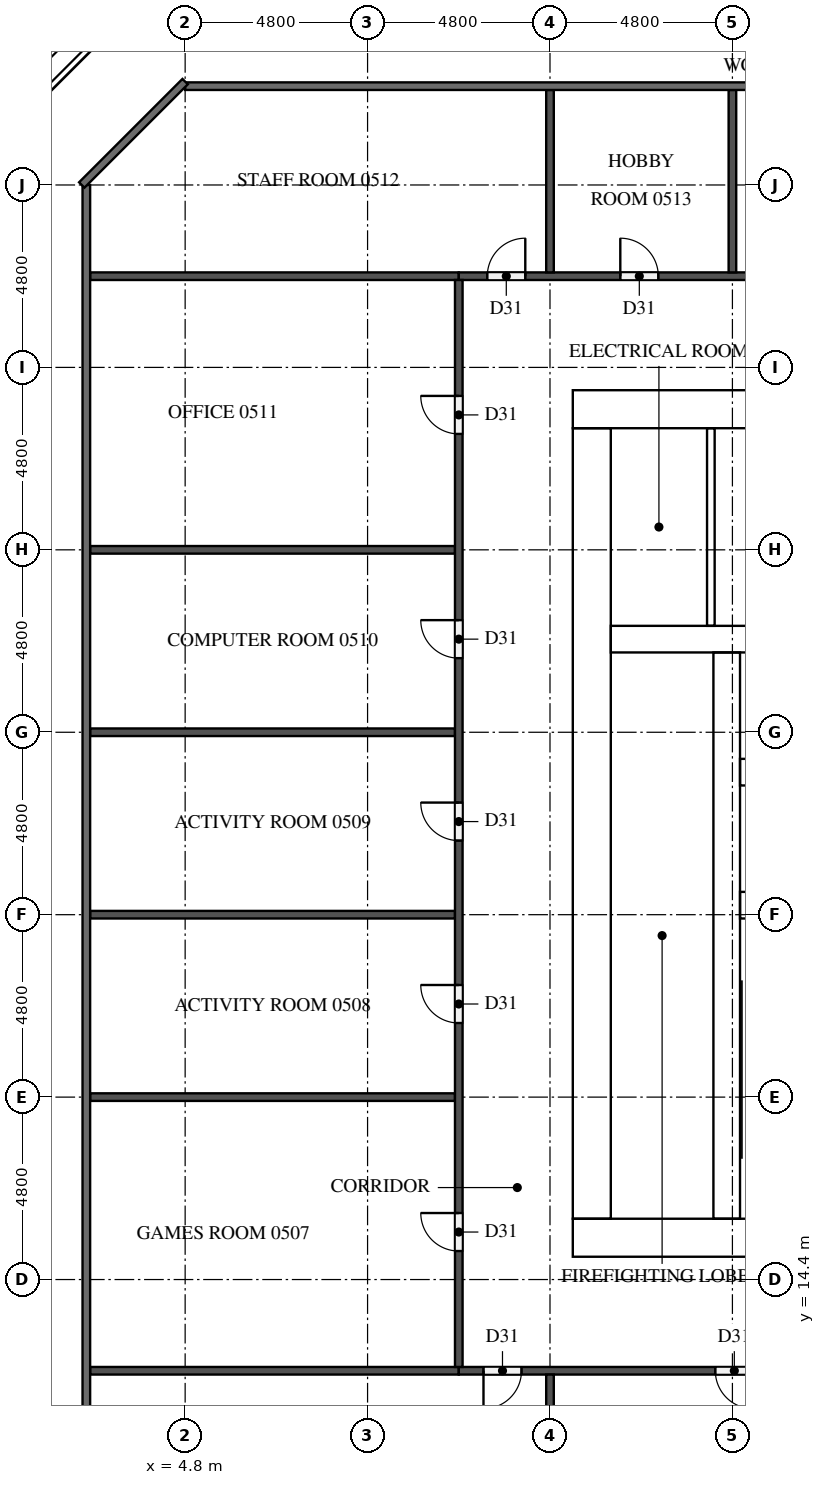
"""IFC4 building model, lengths in metres.
Left out: names, types, materials, properties, quantities, classifications, styles, units other than length and angle.
Written with IfcOpenShell. Run it as: python <this file> out.ifc"""

import sys

from ifc_helpers import new_model, si_unit, direction, frame, frame_2d, origin, place, context, subcontext, project, spatial, rectangle, extrude, element, fill, save


model = new_model("IFC4")
c1 = context("Model", 3, precision=1e-05, world=origin(), true_north=direction((0.0, 1.0)))
c2 = subcontext(c1, "Body", "Model", "MODEL_VIEW")
j1 = project(units=[si_unit("LENGTHUNIT", "METRE"), si_unit("PLANEANGLEUNIT", "RADIAN")], contexts=[c1])
p1 = place(None, origin())
s1 = spatial("IfcSite", under=j1, at=p1, CompositionType="ELEMENT")
p2 = place(p1, origin())
s2 = spatial("IfcBuilding", under=s1, at=p2, CompositionType="ELEMENT")
p3 = place(p2, frame((0.0, 0.0, 24.0)))
s3 = spatial("IfcBuildingStorey", under=s2, at=p3, CompositionType="ELEMENT", Elevation=24.0)
p4 = place(p3, frame((15.0, 15.5, 0.0), z_axis=(0.0, 0.0, 1.0), x_axis=(1.0, 0.0, 0.0)))
e1 = element("IfcWall", 1, at=p4, inside=s3, PredefinedType="SHEAR", context=c2, shape_type="SweptSolid", body=[
    extrude(rectangle(XDim=32.4, YDim=1.0, at=frame_2d((16.2, 0.0))), origin(), (0.0, 0.0, 1.0), 5.1),
])
p5 = place(p4, frame((15.3, 0.0, 0.0)))
e2 = element("IfcOpeningElement", 2, at=p5, cuts=e1, PredefinedType="OPENING", context=c2, shape_type="SweptSolid", body=[
    extrude(rectangle(XDim=1.8, YDim=2.1, at=frame_2d((0.9, 1.05))), frame((0.0, 0.51, 0.0), z_axis=(0.0, -1.0, 0.0), x_axis=(1.0, 0.0, 0.0)), (0.0, 0.0, 1.0), 1.02),
])
p6 = place(p3, frame((15.0, 37.3, 0.0), z_axis=(0.0, 0.0, 1.0), x_axis=(1.0, 0.0, 0.0)))
e3 = element("IfcWall", 3, at=p6, inside=s3, PredefinedType="SHEAR", context=c2, shape_type="SweptSolid", body=[
    extrude(rectangle(XDim=32.4, YDim=1.0, at=frame_2d((16.2, 0.0))), origin(), (0.0, 0.0, 1.0), 5.1),
])
p7 = place(p6, frame((15.3, 0.0, 0.0)))
e4 = element("IfcOpeningElement", 4, at=p7, cuts=e3, PredefinedType="OPENING", context=c2, shape_type="SweptSolid", body=[
    extrude(rectangle(XDim=1.8, YDim=2.1, at=frame_2d((0.9, 1.05))), frame((0.0, 0.51, 0.0), z_axis=(0.0, -1.0, 0.0), x_axis=(1.0, 0.0, 0.0)), (0.0, 0.0, 1.0), 1.02),
])
p8 = place(p6, frame((1.766, 0.0, 0.0)))
e5 = element("IfcOpeningElement", 5, at=p8, cuts=e3, PredefinedType="OPENING", context=c2, shape_type="SweptSolid", body=[
    extrude(rectangle(XDim=1.0, YDim=2.1, at=frame_2d((0.5, 1.05))), frame((0.0, 0.51, 0.0), z_axis=(0.0, -1.0, 0.0), x_axis=(1.0, 0.0, 0.0)), (0.0, 0.0, 1.0), 1.02),
])
p9 = place(p6, frame((5.241, 0.0, 0.0)))
e6 = element("IfcOpeningElement", 6, at=p9, cuts=e3, PredefinedType="OPENING", context=c2, shape_type="SweptSolid", body=[
    extrude(rectangle(XDim=1.0, YDim=2.1, at=frame_2d((0.5, 1.05))), frame((0.0, 0.51, 0.0), z_axis=(0.0, -1.0, 0.0), x_axis=(1.0, 0.0, 0.0)), (0.0, 0.0, 1.0), 1.02),
])
p10 = place(p3, frame((15.5, 16.0, 0.0), z_axis=(0.0, 0.0, 1.0), x_axis=(0.0, 1.0, 0.0)))
e7 = element("IfcWall", 7, at=p10, inside=s3, PredefinedType="SHEAR", context=c2, shape_type="SweptSolid", body=[
    extrude(rectangle(XDim=20.8, YDim=1.0, at=frame_2d((10.4, 0.0))), origin(), (0.0, 0.0, 1.0), 5.1),
])
p11 = place(p10, frame((4.76, 0.0, 0.0)))
e8 = element("IfcOpeningElement", 8, at=p11, cuts=e7, PredefinedType="OPENING", context=c2, shape_type="SweptSolid", body=[
    extrude(rectangle(XDim=1.2, YDim=2.1, at=frame_2d((0.6, 1.05))), frame((0.0, 0.51, 0.0), z_axis=(0.0, -1.0, 0.0), x_axis=(1.0, 0.0, 0.0)), (0.0, 0.0, 1.0), 1.02),
])
p12 = place(p3, frame((19.05, 16.0, 0.0), z_axis=(0.0, 0.0, 1.0), x_axis=(0.0, 1.0, 0.0)))
e9 = element("IfcWall", 9, at=p12, inside=s3, PredefinedType="SHEAR", context=c2, shape_type="SweptSolid", body=[
    extrude(rectangle(XDim=14.9, YDim=0.7, at=frame_2d((7.45, 0.0))), origin(), (0.0, 0.0, 1.0), 5.1),
])
p13 = place(p12, frame((9.45, 0.0, 0.0)))
e10 = element("IfcOpeningElement", 10, at=p13, cuts=e9, PredefinedType="OPENING", context=c2, shape_type="SweptSolid", body=[
    extrude(rectangle(XDim=1.1, YDim=2.1, at=frame_2d((0.55, 1.05))), frame((0.0, 0.36, 0.0), z_axis=(0.0, -1.0, 0.0), x_axis=(1.0, 0.0, 0.0)), (0.0, 0.0, 1.0), 0.72),
])
p14 = place(p12, frame((12.95, 0.0, 0.0)))
e11 = element("IfcOpeningElement", 11, at=p14, cuts=e9, PredefinedType="OPENING", context=c2, shape_type="SweptSolid", body=[
    extrude(rectangle(XDim=1.1, YDim=2.1, at=frame_2d((0.55, 1.05))), frame((0.0, 0.36, 0.0), z_axis=(0.0, -1.0, 0.0), x_axis=(1.0, 0.0, 0.0)), (0.0, 0.0, 1.0), 0.72),
])
p15 = place(p12, frame((0.2, 0.0, 0.0)))
e12 = element("IfcOpeningElement", 12, at=p15, cuts=e9, PredefinedType="OPENING", context=c2, shape_type="SweptSolid", body=[
    extrude(rectangle(XDim=1.2, YDim=2.1, at=frame_2d((0.6, 1.05))), frame((0.0, 0.36, 0.0), z_axis=(0.0, -1.0, 0.0), x_axis=(1.0, 0.0, 0.0)), (0.0, 0.0, 1.0), 0.72),
])
for number, where, z_axis, x_axis in (
    (13, (19.4, 24.25, 0.0), (0.0, 0.0, 1.0), (1.0, 0.0, 0.0)),
    (14, (19.4, 27.75, 0.0), (0.0, 0.0, 1.0), (1.0, 0.0, 0.0)),
):
    element("IfcWall", number, at=place(p3, frame(where, z_axis=z_axis, x_axis=x_axis)), inside=s3, PredefinedType="SHEAR", context=c2, shape_type="SweptSolid", body=[
        extrude(rectangle(XDim=3.35, YDim=0.7, at=frame_2d((1.675, 0.0))), origin(), (0.0, 0.0, 1.0), 5.1),
    ])
p16 = place(p3, frame((16.0, 31.25, 0.0), z_axis=(0.0, 0.0, 1.0), x_axis=(1.0, 0.0, 0.0)))
e15 = element("IfcWall", 15, at=p16, inside=s3, PredefinedType="SHEAR", context=c2, shape_type="SweptSolid", body=[
    extrude(rectangle(XDim=6.75, YDim=0.7, at=frame_2d((3.375, 0.0))), origin(), (0.0, 0.0, 1.0), 5.1),
])
p17 = place(p3, frame((18.633, 31.6, 0.0), z_axis=(0.0, 0.0, 1.0), x_axis=(0.0, 1.0, 0.0)))
e16 = element("IfcWall", 16, at=p17, inside=s3, PredefinedType="PARTITIONING", context=c2, shape_type="SweptSolid", body=[
    extrude(rectangle(XDim=5.2, YDim=0.2, at=frame_2d((2.6, 0.0))), origin(), (0.0, 0.0, 1.0), 5.1),
])
p18 = place(p3, frame((2.3, 12.0, 0.0), z_axis=(0.0, 0.0, 1.0), x_axis=(1.0, 0.0, 0.0)))
e17 = element("IfcWall", 17, at=p18, inside=s3, PredefinedType="PARTITIONING", context=c2, shape_type="SweptSolid", body=[
    extrude(rectangle(XDim=9.7, YDim=0.2, at=frame_2d((4.85, 0.0))), origin(), (0.0, 0.0, 1.0), 5.1),
])
p19 = place(p3, frame((33.6, 12.0, 0.0), z_axis=(0.0, 0.0, 1.0), x_axis=(-1.0, 0.0, 0.0)))
e18 = element("IfcWall", 18, at=p19, inside=s3, PredefinedType="PARTITIONING", context=c2, shape_type="SweptSolid", body=[
    extrude(rectangle(XDim=21.6, YDim=0.2, at=frame_2d((10.8, 0.0))), origin(), (0.0, 0.0, 1.0), 5.1),
])
p20 = place(p19, frame((19.95, 0.0, 0.0)))
e19 = element("IfcOpeningElement", 19, at=p20, cuts=e18, PredefinedType="OPENING", context=c2, shape_type="SweptSolid", body=[
    extrude(rectangle(XDim=1.0, YDim=2.1, at=frame_2d((0.5, 1.05))), frame((0.0, 0.11, 0.0), z_axis=(0.0, -1.0, 0.0), x_axis=(1.0, 0.0, 0.0)), (0.0, 0.0, 1.0), 0.22),
])
p21 = place(p19, frame((13.85, 0.0, 0.0)))
e20 = element("IfcOpeningElement", 20, at=p21, cuts=e18, PredefinedType="OPENING", context=c2, shape_type="SweptSolid", body=[
    extrude(rectangle(XDim=1.0, YDim=2.1, at=frame_2d((0.5, 1.05))), frame((0.0, 0.11, 0.0), z_axis=(0.0, -1.0, 0.0), x_axis=(1.0, 0.0, 0.0)), (0.0, 0.0, 1.0), 0.22),
])
p22 = place(p19, frame((4.35, 0.0, 0.0)))
e21 = element("IfcOpeningElement", 21, at=p22, cuts=e18, PredefinedType="OPENING", context=c2, shape_type="SweptSolid", body=[
    extrude(rectangle(XDim=1.0, YDim=2.1, at=frame_2d((0.5, 1.05))), frame((0.0, 0.11, 0.0), z_axis=(0.0, -1.0, 0.0), x_axis=(1.0, 0.0, 0.0)), (0.0, 0.0, 1.0), 0.22),
])
for number, where, z_axis, x_axis in (
    (22, (2.3, 19.2, 0.0), (0.0, 0.0, 1.0), (1.0, 0.0, 0.0)),
    (23, (2.3, 24.0, 0.0), (0.0, 0.0, 1.0), (1.0, 0.0, 0.0)),
    (24, (2.3, 28.8, 0.0), (0.0, 0.0, 1.0), (1.0, 0.0, 0.0)),
    (25, (2.3, 33.6, 0.0), (0.0, 0.0, 1.0), (1.0, 0.0, 0.0)),
):
    element("IfcWall", number, at=place(p3, frame(where, z_axis=z_axis, x_axis=x_axis)), inside=s3, PredefinedType="PARTITIONING", context=c2, shape_type="SweptSolid", body=[
        extrude(rectangle(XDim=9.6, YDim=0.2, at=frame_2d((4.8, 0.0))), origin(), (0.0, 0.0, 1.0), 5.1),
    ])
p23 = place(p3, frame((2.3, 40.8, 0.0), z_axis=(0.0, 0.0, 1.0), x_axis=(1.0, 0.0, 0.0)))
e26 = element("IfcWall", 26, at=p23, inside=s3, PredefinedType="PARTITIONING", context=c2, shape_type="SweptSolid", body=[
    extrude(rectangle(XDim=9.7, YDim=0.2, at=frame_2d((4.85, 0.0))), origin(), (0.0, 0.0, 1.0), 5.1),
])
p24 = place(p3, frame((12.0, 40.8, 0.0), z_axis=(0.0, 0.0, 1.0), x_axis=(1.0, 0.0, 0.0)))
e27 = element("IfcWall", 27, at=p24, inside=s3, PredefinedType="PARTITIONING", context=c2, shape_type="SweptSolid", body=[
    extrude(rectangle(XDim=10.2, YDim=0.2, at=frame_2d((5.1, 0.0))), origin(), (0.0, 0.0, 1.0), 5.1),
])
p25 = place(p24, frame((0.75, 0.0, 0.0)))
e28 = element("IfcOpeningElement", 28, at=p25, cuts=e27, PredefinedType="OPENING", context=c2, shape_type="SweptSolid", body=[
    extrude(rectangle(XDim=1.0, YDim=2.1, at=frame_2d((0.5, 1.05))), frame((0.0, 0.11, 0.0), z_axis=(0.0, -1.0, 0.0), x_axis=(1.0, 0.0, 0.0)), (0.0, 0.0, 1.0), 0.22),
])
p26 = place(p24, frame((4.25, 0.0, 0.0)))
e29 = element("IfcOpeningElement", 29, at=p26, cuts=e27, PredefinedType="OPENING", context=c2, shape_type="SweptSolid", body=[
    extrude(rectangle(XDim=1.0, YDim=2.1, at=frame_2d((0.5, 1.05))), frame((0.0, 0.11, 0.0), z_axis=(0.0, -1.0, 0.0), x_axis=(1.0, 0.0, 0.0)), (0.0, 0.0, 1.0), 0.22),
])
p27 = place(p3, frame((12.0, 12.1, 0.0), z_axis=(0.0, 0.0, 1.0), x_axis=(0.0, 1.0, 0.0)))
e30 = element("IfcWall", 30, at=p27, inside=s3, PredefinedType="PARTITIONING", context=c2, shape_type="SweptSolid", body=[
    extrude(rectangle(XDim=28.6, YDim=0.2, at=frame_2d((14.3, 0.0))), origin(), (0.0, 0.0, 1.0), 5.1),
])
p28 = place(p27, frame((3.05, 0.0, 0.0)))
e31 = element("IfcOpeningElement", 31, at=p28, cuts=e30, PredefinedType="OPENING", context=c2, shape_type="SweptSolid", body=[
    extrude(rectangle(XDim=1.0, YDim=2.1, at=frame_2d((0.5, 1.05))), frame((0.0, 0.11, 0.0), z_axis=(0.0, -1.0, 0.0), x_axis=(1.0, 0.0, 0.0)), (0.0, 0.0, 1.0), 0.22),
])
p29 = place(p27, frame((9.05, 0.0, 0.0)))
e32 = element("IfcOpeningElement", 32, at=p29, cuts=e30, PredefinedType="OPENING", context=c2, shape_type="SweptSolid", body=[
    extrude(rectangle(XDim=1.0, YDim=2.1, at=frame_2d((0.5, 1.05))), frame((0.0, 0.11, 0.0), z_axis=(0.0, -1.0, 0.0), x_axis=(1.0, 0.0, 0.0)), (0.0, 0.0, 1.0), 0.22),
])
p30 = place(p27, frame((13.85, 0.0, 0.0)))
e33 = element("IfcOpeningElement", 33, at=p30, cuts=e30, PredefinedType="OPENING", context=c2, shape_type="SweptSolid", body=[
    extrude(rectangle(XDim=1.0, YDim=2.1, at=frame_2d((0.5, 1.05))), frame((0.0, 0.11, 0.0), z_axis=(0.0, -1.0, 0.0), x_axis=(1.0, 0.0, 0.0)), (0.0, 0.0, 1.0), 0.22),
])
p31 = place(p27, frame((18.65, 0.0, 0.0)))
e34 = element("IfcOpeningElement", 34, at=p31, cuts=e30, PredefinedType="OPENING", context=c2, shape_type="SweptSolid", body=[
    extrude(rectangle(XDim=1.0, YDim=2.1, at=frame_2d((0.5, 1.05))), frame((0.0, 0.11, 0.0), z_axis=(0.0, -1.0, 0.0), x_axis=(1.0, 0.0, 0.0)), (0.0, 0.0, 1.0), 0.22),
])
p32 = place(p27, frame((24.55, 0.0, 0.0)))
e35 = element("IfcOpeningElement", 35, at=p32, cuts=e30, PredefinedType="OPENING", context=c2, shape_type="SweptSolid", body=[
    extrude(rectangle(XDim=1.0, YDim=2.1, at=frame_2d((0.5, 1.05))), frame((0.0, 0.11, 0.0), z_axis=(0.0, -1.0, 0.0), x_axis=(1.0, 0.0, 0.0)), (0.0, 0.0, 1.0), 0.22),
])
p33 = place(p3, frame((14.4, 2.3, 0.0), z_axis=(0.0, 0.0, 1.0), x_axis=(0.0, 1.0, 0.0)))
e36 = element("IfcWall", 36, at=p33, inside=s3, PredefinedType="PARTITIONING", context=c2, shape_type="SweptSolid", body=[
    extrude(rectangle(XDim=9.6, YDim=0.2, at=frame_2d((4.8, 0.0))), origin(), (0.0, 0.0, 1.0), 5.1),
])
for number, where, z_axis, x_axis in (
    (37, (14.4, 40.9, 0.0), (0.0, 0.0, 1.0), (0.0, 1.0, 0.0)),
    (38, (19.2, 40.9, 0.0), (0.0, 0.0, 1.0), (0.0, 1.0, 0.0)),
):
    element("IfcWall", number, at=place(p3, frame(where, z_axis=z_axis, x_axis=x_axis)), inside=s3, PredefinedType="PARTITIONING", context=c2, shape_type="SweptSolid", body=[
        extrude(rectangle(XDim=4.8, YDim=0.2, at=frame_2d((2.4, 0.0))), origin(), (0.0, 0.0, 1.0), 5.1),
    ])
p34 = place(p13, origin())
e39 = element("IfcDoor", 39, at=p34, inside=s3, OperationType="DOUBLE_DOOR_SLIDING", PredefinedType="DOOR", context=c2, shape_type="SweptSolid", body=[
    extrude(rectangle(XDim=1.1, YDim=2.1, at=frame_2d((0.55, 1.05))), frame((0.0, 0.025, 0.0), z_axis=(0.0, -1.0, 0.0), x_axis=(1.0, 0.0, 0.0)), (0.0, 0.0, 1.0), 0.05),
])
fill(e10, e39)
p35 = place(p14, origin())
e40 = element("IfcDoor", 40, at=p35, inside=s3, OperationType="DOUBLE_DOOR_SLIDING", PredefinedType="DOOR", context=c2, shape_type="SweptSolid", body=[
    extrude(rectangle(XDim=1.1, YDim=2.1, at=frame_2d((0.55, 1.05))), frame((0.0, 0.025, 0.0), z_axis=(0.0, -1.0, 0.0), x_axis=(1.0, 0.0, 0.0)), (0.0, 0.0, 1.0), 0.05),
])
fill(e11, e40)
p36 = place(p15, frame((1.2, 0.0, 0.0), z_axis=(0.0, 0.0, 1.0), x_axis=(-1.0, 0.0, 0.0)))
e41 = element("IfcDoor", 41, at=p36, inside=s3, OperationType="SINGLE_SWING_LEFT", PredefinedType="DOOR", context=c2, shape_type="SweptSolid", body=[
    extrude(rectangle(XDim=1.2, YDim=2.1, at=frame_2d((0.6, 1.05))), frame((0.0, 0.025, 0.0), z_axis=(0.0, -1.0, 0.0), x_axis=(1.0, 0.0, 0.0)), (0.0, 0.0, 1.0), 0.05),
])
fill(e12, e41)
p37 = place(p11, frame((1.2, 0.0, 0.0), z_axis=(0.0, 0.0, 1.0), x_axis=(-1.0, 0.0, 0.0)))
e42 = element("IfcDoor", 42, at=p37, inside=s3, OperationType="SINGLE_SWING_RIGHT", PredefinedType="DOOR", context=c2, shape_type="SweptSolid", body=[
    extrude(rectangle(XDim=1.2, YDim=2.1, at=frame_2d((0.6, 1.05))), frame((0.0, 0.025, 0.0), z_axis=(0.0, -1.0, 0.0), x_axis=(1.0, 0.0, 0.0)), (0.0, 0.0, 1.0), 0.05),
])
fill(e8, e42)
p38 = place(p8, origin())
e43 = element("IfcDoor", 43, at=p38, inside=s3, OperationType="SINGLE_SWING_RIGHT", PredefinedType="DOOR", context=c2, shape_type="SweptSolid", body=[
    extrude(rectangle(XDim=1.0, YDim=2.1, at=frame_2d((0.5, 1.05))), frame((0.0, 0.025, 0.0), z_axis=(0.0, -1.0, 0.0), x_axis=(1.0, 0.0, 0.0)), (0.0, 0.0, 1.0), 0.05),
])
fill(e5, e43)
p39 = place(p20, origin())
e44 = element("IfcDoor", 44, at=p39, inside=s3, OperationType="SINGLE_SWING_RIGHT", PredefinedType="DOOR", context=c2, shape_type="SweptSolid", body=[
    extrude(rectangle(XDim=1.0, YDim=2.1, at=frame_2d((0.5, 1.05))), frame((0.0, 0.025, 0.0), z_axis=(0.0, -1.0, 0.0), x_axis=(1.0, 0.0, 0.0)), (0.0, 0.0, 1.0), 0.05),
])
fill(e19, e44)
p40 = place(p21, origin())
e45 = element("IfcDoor", 45, at=p40, inside=s3, OperationType="SINGLE_SWING_LEFT", PredefinedType="DOOR", context=c2, shape_type="SweptSolid", body=[
    extrude(rectangle(XDim=1.0, YDim=2.1, at=frame_2d((0.5, 1.05))), frame((0.0, 0.025, 0.0), z_axis=(0.0, -1.0, 0.0), x_axis=(1.0, 0.0, 0.0)), (0.0, 0.0, 1.0), 0.05),
])
fill(e20, e45)
p41 = place(p28, origin())
e46 = element("IfcDoor", 46, at=p41, inside=s3, OperationType="SINGLE_SWING_RIGHT", PredefinedType="DOOR", context=c2, shape_type="SweptSolid", body=[
    extrude(rectangle(XDim=1.0, YDim=2.1, at=frame_2d((0.5, 1.05))), frame((0.0, 0.025, 0.0), z_axis=(0.0, -1.0, 0.0), x_axis=(1.0, 0.0, 0.0)), (0.0, 0.0, 1.0), 0.05),
])
fill(e31, e46)
p42 = place(p29, origin())
e47 = element("IfcDoor", 47, at=p42, inside=s3, OperationType="SINGLE_SWING_RIGHT", PredefinedType="DOOR", context=c2, shape_type="SweptSolid", body=[
    extrude(rectangle(XDim=1.0, YDim=2.1, at=frame_2d((0.5, 1.05))), frame((0.0, 0.025, 0.0), z_axis=(0.0, -1.0, 0.0), x_axis=(1.0, 0.0, 0.0)), (0.0, 0.0, 1.0), 0.05),
])
fill(e32, e47)
p43 = place(p30, origin())
e48 = element("IfcDoor", 48, at=p43, inside=s3, OperationType="SINGLE_SWING_RIGHT", PredefinedType="DOOR", context=c2, shape_type="SweptSolid", body=[
    extrude(rectangle(XDim=1.0, YDim=2.1, at=frame_2d((0.5, 1.05))), frame((0.0, 0.025, 0.0), z_axis=(0.0, -1.0, 0.0), x_axis=(1.0, 0.0, 0.0)), (0.0, 0.0, 1.0), 0.05),
])
fill(e33, e48)
p44 = place(p31, origin())
e49 = element("IfcDoor", 49, at=p44, inside=s3, OperationType="SINGLE_SWING_RIGHT", PredefinedType="DOOR", context=c2, shape_type="SweptSolid", body=[
    extrude(rectangle(XDim=1.0, YDim=2.1, at=frame_2d((0.5, 1.05))), frame((0.0, 0.025, 0.0), z_axis=(0.0, -1.0, 0.0), x_axis=(1.0, 0.0, 0.0)), (0.0, 0.0, 1.0), 0.05),
])
fill(e34, e49)
p45 = place(p32, origin())
e50 = element("IfcDoor", 50, at=p45, inside=s3, OperationType="SINGLE_SWING_RIGHT", PredefinedType="DOOR", context=c2, shape_type="SweptSolid", body=[
    extrude(rectangle(XDim=1.0, YDim=2.1, at=frame_2d((0.5, 1.05))), frame((0.0, 0.025, 0.0), z_axis=(0.0, -1.0, 0.0), x_axis=(1.0, 0.0, 0.0)), (0.0, 0.0, 1.0), 0.05),
])
fill(e35, e50)
p46 = place(p25, origin())
e51 = element("IfcDoor", 51, at=p46, inside=s3, OperationType="SINGLE_SWING_RIGHT", PredefinedType="DOOR", context=c2, shape_type="SweptSolid", body=[
    extrude(rectangle(XDim=1.0, YDim=2.1, at=frame_2d((0.5, 1.05))), frame((0.0, 0.025, 0.0), z_axis=(0.0, -1.0, 0.0), x_axis=(1.0, 0.0, 0.0)), (0.0, 0.0, 1.0), 0.05),
])
fill(e28, e51)
p47 = place(p26, origin())
e52 = element("IfcDoor", 52, at=p47, inside=s3, OperationType="SINGLE_SWING_LEFT", PredefinedType="DOOR", context=c2, shape_type="SweptSolid", body=[
    extrude(rectangle(XDim=1.0, YDim=2.1, at=frame_2d((0.5, 1.05))), frame((0.0, 0.025, 0.0), z_axis=(0.0, -1.0, 0.0), x_axis=(1.0, 0.0, 0.0)), (0.0, 0.0, 1.0), 0.05),
])
fill(e29, e52)
save(model, sys.argv[1])
